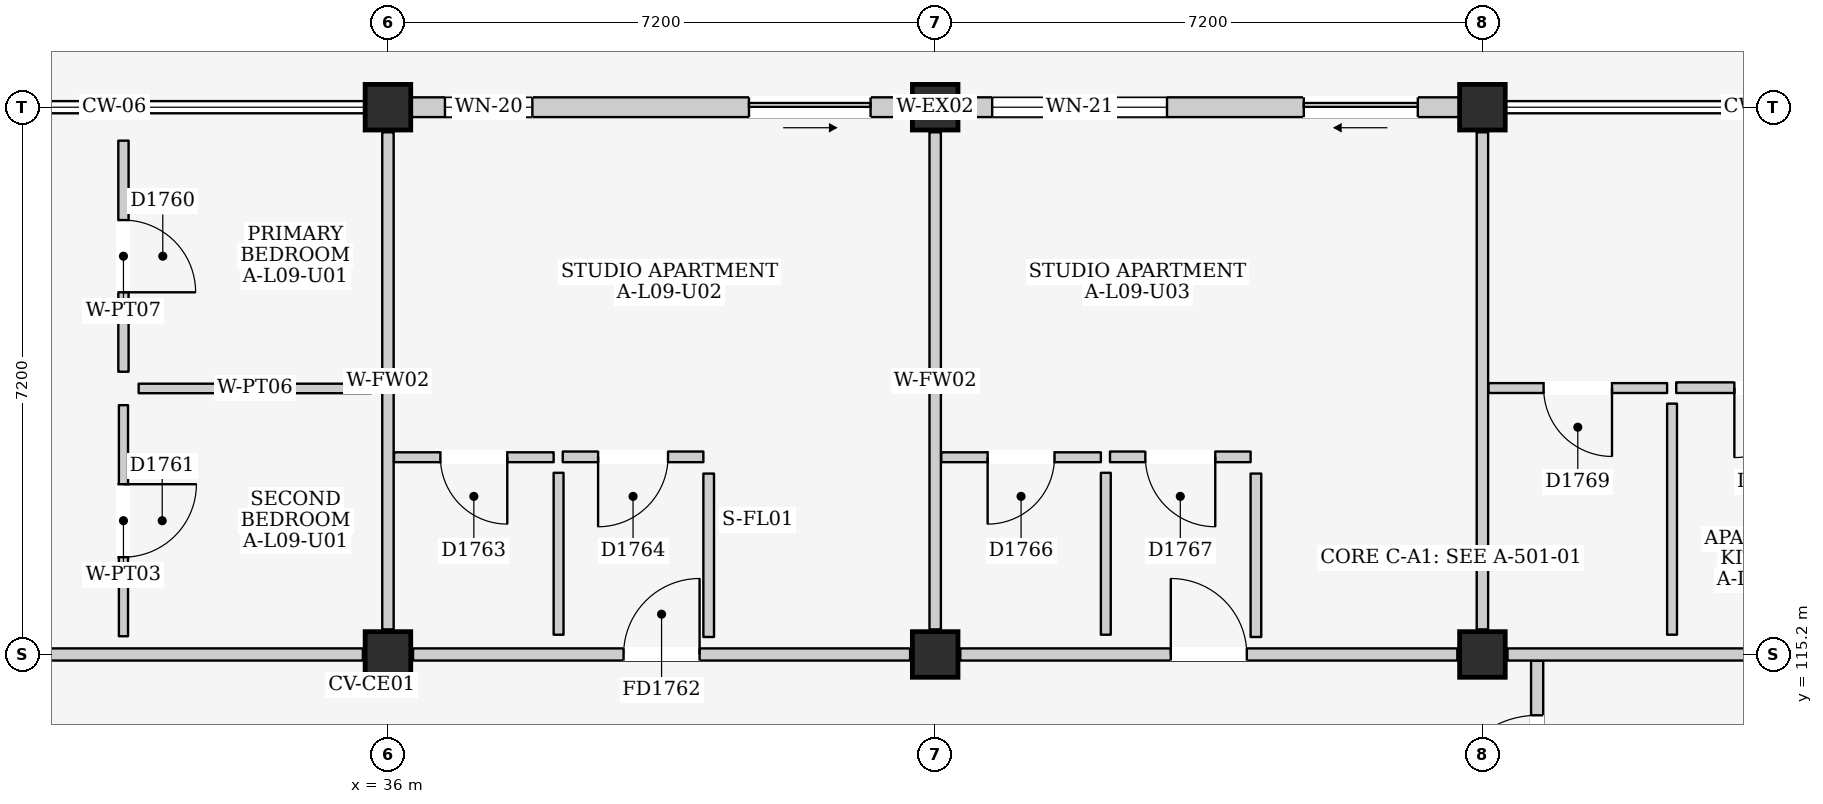
"""IFC4 building model, lengths in metres.
Left out: names, types, materials, properties, quantities, classifications, styles, units other than length and angle.
Written with IfcOpenShell. Run it as: python <this file> out.ifc"""

import sys

from ifc_helpers import new_model, si_unit, direction, frame, frame_2d, origin, origin_2d, place, context, subcontext, project, spatial, rectangle, extrude, element, fill, save


model = new_model("IFC4")
c1 = context("Model", 3, precision=1e-05, world=origin(), true_north=direction((0.0, 1.0)))
c2 = subcontext(c1, "Body", "Model", "MODEL_VIEW")
j1 = project(units=[si_unit("LENGTHUNIT", "METRE"), si_unit("PLANEANGLEUNIT", "RADIAN")], contexts=[c1])
p1 = place(None, origin())
s1 = spatial("IfcSite", under=j1, at=p1, CompositionType="ELEMENT")
p2 = place(p1, origin())
s2 = spatial("IfcBuilding", under=s1, at=p2, CompositionType="ELEMENT")
p3 = place(p2, frame((0.0, 0.0, 31.5)))
s3 = spatial("IfcBuildingStorey", under=s2, at=p3, CompositionType="ELEMENT", Elevation=31.5)
for number, where, z_axis, x_axis in (
    (1, (36.0, 115.2, 0.0), (0.0, 0.0, 1.0), (1.0, 0.0, 0.0)),
    (2, (36.0, 122.4, 0.0), (0.0, 0.0, 1.0), (1.0, 0.0, 0.0)),
    (3, (43.2, 115.2, 0.0), (0.0, 0.0, 1.0), (1.0, 0.0, 0.0)),
    (4, (43.2, 122.4, 0.0), (0.0, 0.0, 1.0), (1.0, 0.0, 0.0)),
    (5, (50.4, 115.2, 0.0), (0.0, 0.0, 1.0), (1.0, 0.0, 0.0)),
    (6, (50.4, 122.4, 0.0), (0.0, 0.0, 1.0), (1.0, 0.0, 0.0)),
):
    element("IfcColumn", number, at=place(p3, frame(where, z_axis=z_axis, x_axis=x_axis)), inside=s3, PredefinedType="COLUMN", context=c2, shape_type="SweptSolid", body=[
        extrude(rectangle(XDim=0.6, YDim=0.6, at=origin_2d()), origin(), (0.0, 0.0, 1.0), 3.3),
    ])
p4 = place(p3, frame((36.3, 122.4, 0.0), z_axis=(0.0, 0.0, 1.0), x_axis=(1.0, 0.0, 0.0)))
e7 = element("IfcWall", 7, at=p4, inside=s3, PredefinedType="ELEMENTEDWALL", context=c2, shape_type="SweptSolid", body=[
    extrude(rectangle(XDim=6.6, YDim=0.26, at=frame_2d((3.3, 0.0))), origin(), (0.0, 0.0, 1.0), 2.615),
])
p5 = place(p4, frame((4.45, 0.0, 0.0)))
e8 = element("IfcOpeningElement", 8, at=p5, cuts=e7, PredefinedType="OPENING", context=c2, shape_type="SweptSolid", body=[
    extrude(rectangle(XDim=1.6, YDim=2.12, at=frame_2d((0.8, 1.06))), frame((0.0, 0.145, 0.0), z_axis=(0.0, -1.0, 0.0), x_axis=(1.0, 0.0, 0.0)), (0.0, 0.0, 1.0), 0.29),
])
p6 = place(p4, frame((0.45, 0.0, 0.9)))
e9 = element("IfcOpeningElement", 9, at=p6, cuts=e7, PredefinedType="OPENING", context=c2, shape_type="SweptSolid", body=[
    extrude(rectangle(XDim=1.15, YDim=1.15, at=frame_2d((0.575, 0.575))), frame((0.0, 0.145, 0.0), z_axis=(0.0, -1.0, 0.0), x_axis=(1.0, 0.0, 0.0)), (0.0, 0.0, 1.0), 0.29),
])
p7 = place(p3, frame((43.5, 122.4, 0.0), z_axis=(0.0, 0.0, 1.0), x_axis=(1.0, 0.0, 0.0)))
e10 = element("IfcWall", 10, at=p7, inside=s3, PredefinedType="ELEMENTEDWALL", context=c2, shape_type="SweptSolid", body=[
    extrude(rectangle(XDim=6.6, YDim=0.26, at=frame_2d((3.3, 0.0))), origin(), (0.0, 0.0, 1.0), 2.615),
])
p8 = place(p7, frame((4.55, 0.0, 0.0)))
e11 = element("IfcOpeningElement", 11, at=p8, cuts=e10, PredefinedType="OPENING", context=c2, shape_type="SweptSolid", body=[
    extrude(rectangle(XDim=1.5, YDim=2.12, at=frame_2d((0.75, 1.06))), frame((0.0, 0.145, 0.0), z_axis=(0.0, -1.0, 0.0), x_axis=(1.0, 0.0, 0.0)), (0.0, 0.0, 1.0), 0.29),
])
p9 = place(p7, frame((0.45, 0.0, 0.9)))
e12 = element("IfcOpeningElement", 12, at=p9, cuts=e10, PredefinedType="OPENING", context=c2, shape_type="SweptSolid", body=[
    extrude(rectangle(XDim=2.3, YDim=1.6, at=frame_2d((1.15, 0.8))), frame((0.0, 0.145, 0.0), z_axis=(0.0, -1.0, 0.0), x_axis=(1.0, 0.0, 0.0)), (0.0, 0.0, 1.0), 0.29),
])
p10 = place(p3, frame((51.12, 111.1, 0.0), z_axis=(0.0, 0.0, 1.0), x_axis=(0.0, 1.0, 0.0)))
e13 = element("IfcWall", 13, at=p10, inside=s3, PredefinedType="PARTITIONING", context=c2, shape_type="SweptSolid", body=[
    extrude(rectangle(XDim=4.02, YDim=0.16, at=frame_2d((2.01, 0.0))), origin(), (0.0, 0.0, 1.0), 3.08),
])
p11 = place(p10, frame((2.1, 0.0, 0.0)))
e14 = element("IfcOpeningElement", 14, at=p11, cuts=e13, PredefinedType="OPENING", context=c2, shape_type="SweptSolid", body=[
    extrude(rectangle(XDim=1.2, YDim=2.2, at=frame_2d((0.6, 1.1))), frame((0.0, 0.095, 0.0), z_axis=(0.0, -1.0, 0.0), x_axis=(1.0, 0.0, 0.0)), (0.0, 0.0, 1.0), 0.19),
])
p12 = place(p3, frame((29.13, 115.2, 0.0), z_axis=(0.0, 0.0, 1.0), x_axis=(1.0, 0.0, 0.0)))
e15 = element("IfcWall", 15, at=p12, inside=s3, PredefinedType="PARTITIONING", context=c2, shape_type="SweptSolid", body=[
    extrude(rectangle(XDim=6.54, YDim=0.16, at=frame_2d((3.27, 0.0))), origin(), (0.0, 0.0, 1.0), 2.415),
])
p13 = place(p3, frame((36.0, 115.53, 0.0), z_axis=(0.0, 0.0, 1.0), x_axis=(0.0, 1.0, 0.0)))
e16 = element("IfcWall", 16, at=p13, inside=s3, PredefinedType="PARTITIONING", context=c2, shape_type="SweptSolid", body=[
    extrude(rectangle(XDim=6.54, YDim=0.15, at=frame_2d((3.27, 0.0))), origin(), (0.0, 0.0, 1.0), 2.565),
])
p14 = place(p3, frame((32.52, 118.92, 0.0), z_axis=(0.0, 0.0, 1.0), x_axis=(0.0, 1.0, 0.0)))
e17 = element("IfcWall", 17, at=p14, inside=s3, PredefinedType="PARTITIONING", context=c2, shape_type="SweptSolid", body=[
    extrude(rectangle(XDim=3.04, YDim=0.135, at=frame_2d((1.52, 0.0))), origin(), (0.0, 0.0, 1.0), 3.08),
])
p15 = place(p14, frame((1.045, 0.0, 0.0)))
e18 = element("IfcOpeningElement", 18, at=p15, cuts=e17, PredefinedType="OPENING", context=c2, shape_type="SweptSolid", body=[
    extrude(rectangle(XDim=0.95, YDim=2.15, at=frame_2d((0.475, 1.075))), frame((0.0, 0.083, 0.0), z_axis=(0.0, -1.0, 0.0), x_axis=(1.0, 0.0, 0.0)), (0.0, 0.0, 1.0), 0.165),
])
p16 = place(p3, frame((32.72, 118.7, 0.0), z_axis=(0.0, 0.0, 1.0), x_axis=(1.0, 0.0, 0.0)))
e19 = element("IfcWall", 19, at=p16, inside=s3, PredefinedType="PARTITIONING", context=c2, shape_type="SweptSolid", body=[
    extrude(rectangle(XDim=3.06, YDim=0.125, at=frame_2d((1.53, 0.0))), origin(), (0.0, 0.0, 1.0), 3.08),
])
p17 = place(p3, frame((32.52, 115.44, 0.0), z_axis=(0.0, 0.0, 1.0), x_axis=(0.0, 1.0, 0.0)))
e20 = element("IfcWall", 20, at=p17, inside=s3, PredefinedType="PARTITIONING", context=c2, shape_type="SweptSolid", body=[
    extrude(rectangle(XDim=3.04, YDim=0.12, at=frame_2d((1.52, 0.0))), origin(), (0.0, 0.0, 1.0), 3.08),
])
p18 = place(p17, frame((1.04, 0.0, 0.0)))
e21 = element("IfcOpeningElement", 21, at=p18, cuts=e20, PredefinedType="OPENING", context=c2, shape_type="SweptSolid", body=[
    extrude(rectangle(XDim=0.96, YDim=2.15, at=frame_2d((0.48, 1.075))), frame((0.0, 0.075, 0.0), z_axis=(0.0, -1.0, 0.0), x_axis=(1.0, 0.0, 0.0)), (0.0, 0.0, 1.0), 0.15),
])
p19 = place(p3, frame((36.33, 115.2, 0.0), z_axis=(0.0, 0.0, 1.0), x_axis=(1.0, 0.0, 0.0)))
e22 = element("IfcWall", 22, at=p19, inside=s3, PredefinedType="PARTITIONING", context=c2, shape_type="SweptSolid", body=[
    extrude(rectangle(XDim=6.54, YDim=0.16, at=frame_2d((3.27, 0.0))), origin(), (0.0, 0.0, 1.0), 2.415),
])
p20 = place(p19, frame((2.77, 0.0, 0.0)))
e23 = element("IfcOpeningElement", 23, at=p20, cuts=e22, PredefinedType="OPENING", context=c2, shape_type="SweptSolid", body=[
    extrude(rectangle(XDim=1.0, YDim=2.15, at=frame_2d((0.5, 1.075))), frame((0.0, 0.095, 0.0), z_axis=(0.0, -1.0, 0.0), x_axis=(1.0, 0.0, 0.0)), (0.0, 0.0, 1.0), 0.19),
])
p21 = place(p3, frame((43.2, 115.53, 0.0), z_axis=(0.0, 0.0, 1.0), x_axis=(0.0, 1.0, 0.0)))
e24 = element("IfcWall", 24, at=p21, inside=s3, PredefinedType="PARTITIONING", context=c2, shape_type="SweptSolid", body=[
    extrude(rectangle(XDim=6.54, YDim=0.15, at=frame_2d((3.27, 0.0))), origin(), (0.0, 0.0, 1.0), 2.565),
])
p22 = place(p3, frame((36.08, 117.795, 0.0), z_axis=(0.0, 0.0, 1.0), x_axis=(1.0, 0.0, 0.0)))
e25 = element("IfcWall", 25, at=p22, inside=s3, PredefinedType="PARTITIONING", context=c2, shape_type="SweptSolid", body=[
    extrude(rectangle(XDim=2.1, YDim=0.13, at=frame_2d((1.05, 0.0))), origin(), (0.0, 0.0, 1.0), 3.08),
])
p23 = place(p22, frame((0.61, 0.0, 0.0)))
e26 = element("IfcOpeningElement", 26, at=p23, cuts=e25, PredefinedType="OPENING", context=c2, shape_type="SweptSolid", body=[
    extrude(rectangle(XDim=0.88, YDim=2.1, at=frame_2d((0.44, 1.05))), frame((0.0, 0.08, 0.0), z_axis=(0.0, -1.0, 0.0), x_axis=(1.0, 0.0, 0.0)), (0.0, 0.0, 1.0), 0.16),
])
p24 = place(p3, frame((38.245, 115.46, 0.0), z_axis=(0.0, 0.0, 1.0), x_axis=(0.0, 1.0, 0.0)))
e27 = element("IfcWall", 27, at=p24, inside=s3, PredefinedType="PARTITIONING", context=c2, shape_type="SweptSolid", body=[
    extrude(rectangle(XDim=2.13, YDim=0.13, at=frame_2d((1.065, 0.0))), origin(), (0.0, 0.0, 1.0), 3.08),
])
p25 = place(p3, frame((38.3, 117.8, 0.0), z_axis=(0.0, 0.0, 1.0), x_axis=(1.0, 0.0, 0.0)))
e28 = element("IfcWall", 28, at=p25, inside=s3, PredefinedType="PARTITIONING", context=c2, shape_type="SweptSolid", body=[
    extrude(rectangle(XDim=1.85, YDim=0.14, at=frame_2d((0.925, 0.0))), origin(), (0.0, 0.0, 1.0), 3.08),
])
p26 = place(p25, frame((0.465, 0.0, 0.0)))
e29 = element("IfcOpeningElement", 29, at=p26, cuts=e28, PredefinedType="OPENING", context=c2, shape_type="SweptSolid", body=[
    extrude(rectangle(XDim=0.92, YDim=2.1, at=frame_2d((0.46, 1.05))), frame((0.0, 0.085, 0.0), z_axis=(0.0, -1.0, 0.0), x_axis=(1.0, 0.0, 0.0)), (0.0, 0.0, 1.0), 0.17),
])
p27 = place(p3, frame((40.22, 115.43, 0.0), z_axis=(0.0, 0.0, 1.0), x_axis=(0.0, 1.0, 0.0)))
e30 = element("IfcWall", 30, at=p27, inside=s3, PredefinedType="PARTITIONING", context=c2, shape_type="SweptSolid", body=[
    extrude(rectangle(XDim=2.15, YDim=0.14, at=frame_2d((1.075, 0.0))), origin(), (0.0, 0.0, 1.0), 3.08),
])
p28 = place(p3, frame((43.53, 115.2, 0.0), z_axis=(0.0, 0.0, 1.0), x_axis=(1.0, 0.0, 0.0)))
e31 = element("IfcWall", 31, at=p28, inside=s3, PredefinedType="PARTITIONING", context=c2, shape_type="SweptSolid", body=[
    extrude(rectangle(XDim=6.54, YDim=0.16, at=frame_2d((3.27, 0.0))), origin(), (0.0, 0.0, 1.0), 2.415),
])
p29 = place(p28, frame((2.77, 0.0, 0.0)))
e32 = element("IfcOpeningElement", 32, at=p29, cuts=e31, PredefinedType="OPENING", context=c2, shape_type="SweptSolid", body=[
    extrude(rectangle(XDim=1.0, YDim=2.15, at=frame_2d((0.5, 1.075))), frame((0.0, 0.095, 0.0), z_axis=(0.0, -1.0, 0.0), x_axis=(1.0, 0.0, 0.0)), (0.0, 0.0, 1.0), 0.19),
])
p30 = place(p3, frame((50.4, 115.53, 0.0), z_axis=(0.0, 0.0, 1.0), x_axis=(0.0, 1.0, 0.0)))
e33 = element("IfcWall", 33, at=p30, inside=s3, PredefinedType="PARTITIONING", context=c2, shape_type="SweptSolid", body=[
    extrude(rectangle(XDim=6.54, YDim=0.15, at=frame_2d((3.27, 0.0))), origin(), (0.0, 0.0, 1.0), 2.565),
])
p31 = place(p3, frame((43.28, 117.795, 0.0), z_axis=(0.0, 0.0, 1.0), x_axis=(1.0, 0.0, 0.0)))
e34 = element("IfcWall", 34, at=p31, inside=s3, PredefinedType="PARTITIONING", context=c2, shape_type="SweptSolid", body=[
    extrude(rectangle(XDim=2.1, YDim=0.13, at=frame_2d((1.05, 0.0))), origin(), (0.0, 0.0, 1.0), 3.08),
])
p32 = place(p31, frame((0.61, 0.0, 0.0)))
e35 = element("IfcOpeningElement", 35, at=p32, cuts=e34, PredefinedType="OPENING", context=c2, shape_type="SweptSolid", body=[
    extrude(rectangle(XDim=0.88, YDim=2.1, at=frame_2d((0.44, 1.05))), frame((0.0, 0.08, 0.0), z_axis=(0.0, -1.0, 0.0), x_axis=(1.0, 0.0, 0.0)), (0.0, 0.0, 1.0), 0.16),
])
p33 = place(p3, frame((45.445, 115.46, 0.0), z_axis=(0.0, 0.0, 1.0), x_axis=(0.0, 1.0, 0.0)))
e36 = element("IfcWall", 36, at=p33, inside=s3, PredefinedType="PARTITIONING", context=c2, shape_type="SweptSolid", body=[
    extrude(rectangle(XDim=2.13, YDim=0.13, at=frame_2d((1.065, 0.0))), origin(), (0.0, 0.0, 1.0), 3.08),
])
p34 = place(p3, frame((45.5, 117.8, 0.0), z_axis=(0.0, 0.0, 1.0), x_axis=(1.0, 0.0, 0.0)))
e37 = element("IfcWall", 37, at=p34, inside=s3, PredefinedType="PARTITIONING", context=c2, shape_type="SweptSolid", body=[
    extrude(rectangle(XDim=1.85, YDim=0.14, at=frame_2d((0.925, 0.0))), origin(), (0.0, 0.0, 1.0), 3.08),
])
p35 = place(p34, frame((0.465, 0.0, 0.0)))
e38 = element("IfcOpeningElement", 38, at=p35, cuts=e37, PredefinedType="OPENING", context=c2, shape_type="SweptSolid", body=[
    extrude(rectangle(XDim=0.92, YDim=2.1, at=frame_2d((0.46, 1.05))), frame((0.0, 0.085, 0.0), z_axis=(0.0, -1.0, 0.0), x_axis=(1.0, 0.0, 0.0)), (0.0, 0.0, 1.0), 0.17),
])
p36 = place(p3, frame((47.42, 115.43, 0.0), z_axis=(0.0, 0.0, 1.0), x_axis=(0.0, 1.0, 0.0)))
e39 = element("IfcWall", 39, at=p36, inside=s3, PredefinedType="PARTITIONING", context=c2, shape_type="SweptSolid", body=[
    extrude(rectangle(XDim=2.15, YDim=0.14, at=frame_2d((1.075, 0.0))), origin(), (0.0, 0.0, 1.0), 3.08),
])
p37 = place(p3, frame((50.73, 115.2, 0.0), z_axis=(0.0, 0.0, 1.0), x_axis=(1.0, 0.0, 0.0)))
e40 = element("IfcWall", 40, at=p37, inside=s3, PredefinedType="PARTITIONING", context=c2, shape_type="SweptSolid", body=[
    extrude(rectangle(XDim=6.54, YDim=0.16, at=frame_2d((3.27, 0.0))), origin(), (0.0, 0.0, 1.0), 2.415),
])
p38 = place(p3, frame((50.48, 118.705, 0.0), z_axis=(0.0, 0.0, 1.0), x_axis=(1.0, 0.0, 0.0)))
e41 = element("IfcWall", 41, at=p38, inside=s3, PredefinedType="PARTITIONING", context=c2, shape_type="SweptSolid", body=[
    extrude(rectangle(XDim=2.35, YDim=0.13, at=frame_2d((1.175, 0.0))), origin(), (0.0, 0.0, 1.0), 3.08),
])
p39 = place(p38, frame((0.725, 0.0, 0.0)))
e42 = element("IfcOpeningElement", 42, at=p39, cuts=e41, PredefinedType="OPENING", context=c2, shape_type="SweptSolid", body=[
    extrude(rectangle(XDim=0.9, YDim=2.1, at=frame_2d((0.45, 1.05))), frame((0.0, 0.08, 0.0), z_axis=(0.0, -1.0, 0.0), x_axis=(1.0, 0.0, 0.0)), (0.0, 0.0, 1.0), 0.16),
])
p40 = place(p3, frame((52.895, 115.46, 0.0), z_axis=(0.0, 0.0, 1.0), x_axis=(0.0, 1.0, 0.0)))
e43 = element("IfcWall", 43, at=p40, inside=s3, PredefinedType="PARTITIONING", context=c2, shape_type="SweptSolid", body=[
    extrude(rectangle(XDim=3.04, YDim=0.13, at=frame_2d((1.52, 0.0))), origin(), (0.0, 0.0, 1.0), 3.08),
])
p41 = place(p3, frame((52.95, 118.71, 0.0), z_axis=(0.0, 0.0, 1.0), x_axis=(1.0, 0.0, 0.0)))
e44 = element("IfcWall", 44, at=p41, inside=s3, PredefinedType="PARTITIONING", context=c2, shape_type="SweptSolid", body=[
    extrude(rectangle(XDim=2.45, YDim=0.14, at=frame_2d((1.225, 0.0))), origin(), (0.0, 0.0, 1.0), 3.08),
])
p42 = place(p41, frame((0.765, 0.0, 0.0)))
e45 = element("IfcOpeningElement", 45, at=p42, cuts=e44, PredefinedType="OPENING", context=c2, shape_type="SweptSolid", body=[
    extrude(rectangle(XDim=0.92, YDim=2.1, at=frame_2d((0.46, 1.05))), frame((0.0, 0.085, 0.0), z_axis=(0.0, -1.0, 0.0), x_axis=(1.0, 0.0, 0.0)), (0.0, 0.0, 1.0), 0.17),
])
p43 = place(p5, frame((1.6, 0.0, 0.0), z_axis=(0.0, 0.0, 1.0), x_axis=(-1.0, 0.0, 0.0)))
e46 = element("IfcDoor", 46, at=p43, inside=s3, OperationType="SLIDING_TO_RIGHT", PredefinedType="DOOR", context=c2, shape_type="SweptSolid", body=[
    extrude(rectangle(XDim=1.6, YDim=2.12, at=frame_2d((0.8, 1.06))), frame((0.0, 0.025, 0.0), z_axis=(0.0, -1.0, 0.0), x_axis=(1.0, 0.0, 0.0)), (0.0, 0.0, 1.0), 0.05),
])
fill(e8, e46)
p44 = place(p6, origin())
e47 = element("IfcWindow", 47, at=p44, inside=s3, PartitioningType="SINGLE_PANEL", PredefinedType="WINDOW", context=c2, shape_type="SweptSolid", body=[
    extrude(rectangle(XDim=1.15, YDim=1.15, at=frame_2d((0.575, 0.575))), frame((0.0, 0.03, 0.0), z_axis=(0.0, -1.0, 0.0), x_axis=(1.0, 0.0, 0.0)), (0.0, 0.0, 1.0), 0.06),
])
fill(e9, e47)
p45 = place(p8, frame((1.5, 0.0, 0.0), z_axis=(0.0, 0.0, 1.0), x_axis=(-1.0, 0.0, 0.0)))
e48 = element("IfcDoor", 48, at=p45, inside=s3, OperationType="SLIDING_TO_LEFT", PredefinedType="DOOR", context=c2, shape_type="SweptSolid", body=[
    extrude(rectangle(XDim=1.5, YDim=2.12, at=frame_2d((0.75, 1.06))), frame((0.0, 0.025, 0.0), z_axis=(0.0, -1.0, 0.0), x_axis=(1.0, 0.0, 0.0)), (0.0, 0.0, 1.0), 0.05),
])
fill(e11, e48)
p46 = place(p9, origin())
e49 = element("IfcWindow", 49, at=p46, inside=s3, PartitioningType="TRIPLE_PANEL_VERTICAL", PredefinedType="WINDOW", context=c2, shape_type="SweptSolid", body=[
    extrude(rectangle(XDim=2.3, YDim=1.6, at=frame_2d((1.15, 0.8))), frame((0.0, 0.03, 0.0), z_axis=(0.0, -1.0, 0.0), x_axis=(1.0, 0.0, 0.0)), (0.0, 0.0, 1.0), 0.06),
])
fill(e12, e49)
p47 = place(p11, origin())
e50 = element("IfcDoor", 50, at=p47, inside=s3, OperationType="SINGLE_SWING_LEFT", PredefinedType="DOOR", context=c2, shape_type="SweptSolid", body=[
    extrude(rectangle(XDim=1.2, YDim=2.2, at=frame_2d((0.6, 1.1))), frame((0.0, 0.025, 0.0), z_axis=(0.0, -1.0, 0.0), x_axis=(1.0, 0.0, 0.0)), (0.0, 0.0, 1.0), 0.05),
])
fill(e14, e50)
p48 = place(p15, frame((0.95, 0.0, 0.0), z_axis=(0.0, 0.0, 1.0), x_axis=(-1.0, 0.0, 0.0)))
e51 = element("IfcDoor", 51, at=p48, inside=s3, OperationType="SINGLE_SWING_RIGHT", PredefinedType="DOOR", context=c2, shape_type="SweptSolid", body=[
    extrude(rectangle(XDim=0.95, YDim=2.15, at=frame_2d((0.475, 1.075))), frame((0.0, 0.025, 0.0), z_axis=(0.0, -1.0, 0.0), x_axis=(1.0, 0.0, 0.0)), (0.0, 0.0, 1.0), 0.05),
])
fill(e18, e51)
p49 = place(p18, frame((0.96, 0.0, 0.0), z_axis=(0.0, 0.0, 1.0), x_axis=(-1.0, 0.0, 0.0)))
e52 = element("IfcDoor", 52, at=p49, inside=s3, OperationType="SINGLE_SWING_LEFT", PredefinedType="DOOR", context=c2, shape_type="SweptSolid", body=[
    extrude(rectangle(XDim=0.96, YDim=2.15, at=frame_2d((0.48, 1.075))), frame((0.0, 0.025, 0.0), z_axis=(0.0, -1.0, 0.0), x_axis=(1.0, 0.0, 0.0)), (0.0, 0.0, 1.0), 0.05),
])
fill(e21, e52)
p50 = place(p20, origin())
e53 = element("IfcDoor", 53, at=p50, inside=s3, OperationType="SINGLE_SWING_RIGHT", PredefinedType="DOOR", context=c2, shape_type="SweptSolid", body=[
    extrude(rectangle(XDim=1.0, YDim=2.15, at=frame_2d((0.5, 1.075))), frame((0.0, 0.025, 0.0), z_axis=(0.0, -1.0, 0.0), x_axis=(1.0, 0.0, 0.0)), (0.0, 0.0, 1.0), 0.05),
])
fill(e23, e53)
p51 = place(p23, frame((0.88, 0.0, 0.0), z_axis=(0.0, 0.0, 1.0), x_axis=(-1.0, 0.0, 0.0)))
e54 = element("IfcDoor", 54, at=p51, inside=s3, OperationType="SINGLE_SWING_LEFT", PredefinedType="DOOR", context=c2, shape_type="SweptSolid", body=[
    extrude(rectangle(XDim=0.88, YDim=2.1, at=frame_2d((0.44, 1.05))), frame((0.0, 0.025, 0.0), z_axis=(0.0, -1.0, 0.0), x_axis=(1.0, 0.0, 0.0)), (0.0, 0.0, 1.0), 0.05),
])
fill(e26, e54)
p52 = place(p26, frame((0.92, 0.0, 0.0), z_axis=(0.0, 0.0, 1.0), x_axis=(-1.0, 0.0, 0.0)))
e55 = element("IfcDoor", 55, at=p52, inside=s3, OperationType="SINGLE_SWING_RIGHT", PredefinedType="DOOR", context=c2, shape_type="SweptSolid", body=[
    extrude(rectangle(XDim=0.92, YDim=2.1, at=frame_2d((0.46, 1.05))), frame((0.0, 0.025, 0.0), z_axis=(0.0, -1.0, 0.0), x_axis=(1.0, 0.0, 0.0)), (0.0, 0.0, 1.0), 0.05),
])
fill(e29, e55)
p53 = place(p29, origin())
e56 = element("IfcDoor", 56, at=p53, inside=s3, OperationType="SINGLE_SWING_LEFT", PredefinedType="DOOR", context=c2, shape_type="SweptSolid", body=[
    extrude(rectangle(XDim=1.0, YDim=2.15, at=frame_2d((0.5, 1.075))), frame((0.0, 0.025, 0.0), z_axis=(0.0, -1.0, 0.0), x_axis=(1.0, 0.0, 0.0)), (0.0, 0.0, 1.0), 0.05),
])
fill(e32, e56)
p54 = place(p32, frame((0.88, 0.0, 0.0), z_axis=(0.0, 0.0, 1.0), x_axis=(-1.0, 0.0, 0.0)))
e57 = element("IfcDoor", 57, at=p54, inside=s3, OperationType="SINGLE_SWING_RIGHT", PredefinedType="DOOR", context=c2, shape_type="SweptSolid", body=[
    extrude(rectangle(XDim=0.88, YDim=2.1, at=frame_2d((0.44, 1.05))), frame((0.0, 0.025, 0.0), z_axis=(0.0, -1.0, 0.0), x_axis=(1.0, 0.0, 0.0)), (0.0, 0.0, 1.0), 0.05),
])
fill(e35, e57)
p55 = place(p35, frame((0.92, 0.0, 0.0), z_axis=(0.0, 0.0, 1.0), x_axis=(-1.0, 0.0, 0.0)))
e58 = element("IfcDoor", 58, at=p55, inside=s3, OperationType="SINGLE_SWING_LEFT", PredefinedType="DOOR", context=c2, shape_type="SweptSolid", body=[
    extrude(rectangle(XDim=0.92, YDim=2.1, at=frame_2d((0.46, 1.05))), frame((0.0, 0.025, 0.0), z_axis=(0.0, -1.0, 0.0), x_axis=(1.0, 0.0, 0.0)), (0.0, 0.0, 1.0), 0.05),
])
fill(e38, e58)
p56 = place(p39, frame((0.9, 0.0, 0.0), z_axis=(0.0, 0.0, 1.0), x_axis=(-1.0, 0.0, 0.0)))
e59 = element("IfcDoor", 59, at=p56, inside=s3, OperationType="SINGLE_SWING_LEFT", PredefinedType="DOOR", context=c2, shape_type="SweptSolid", body=[
    extrude(rectangle(XDim=0.9, YDim=2.1, at=frame_2d((0.45, 1.05))), frame((0.0, 0.025, 0.0), z_axis=(0.0, -1.0, 0.0), x_axis=(1.0, 0.0, 0.0)), (0.0, 0.0, 1.0), 0.05),
])
fill(e42, e59)
p57 = place(p42, frame((0.92, 0.0, 0.0), z_axis=(0.0, 0.0, 1.0), x_axis=(-1.0, 0.0, 0.0)))
e60 = element("IfcDoor", 60, at=p57, inside=s3, OperationType="SINGLE_SWING_RIGHT", PredefinedType="DOOR", context=c2, shape_type="SweptSolid", body=[
    extrude(rectangle(XDim=0.92, YDim=2.1, at=frame_2d((0.46, 1.05))), frame((0.0, 0.025, 0.0), z_axis=(0.0, -1.0, 0.0), x_axis=(1.0, 0.0, 0.0)), (0.0, 0.0, 1.0), 0.05),
])
fill(e45, e60)
save(model, sys.argv[1])
